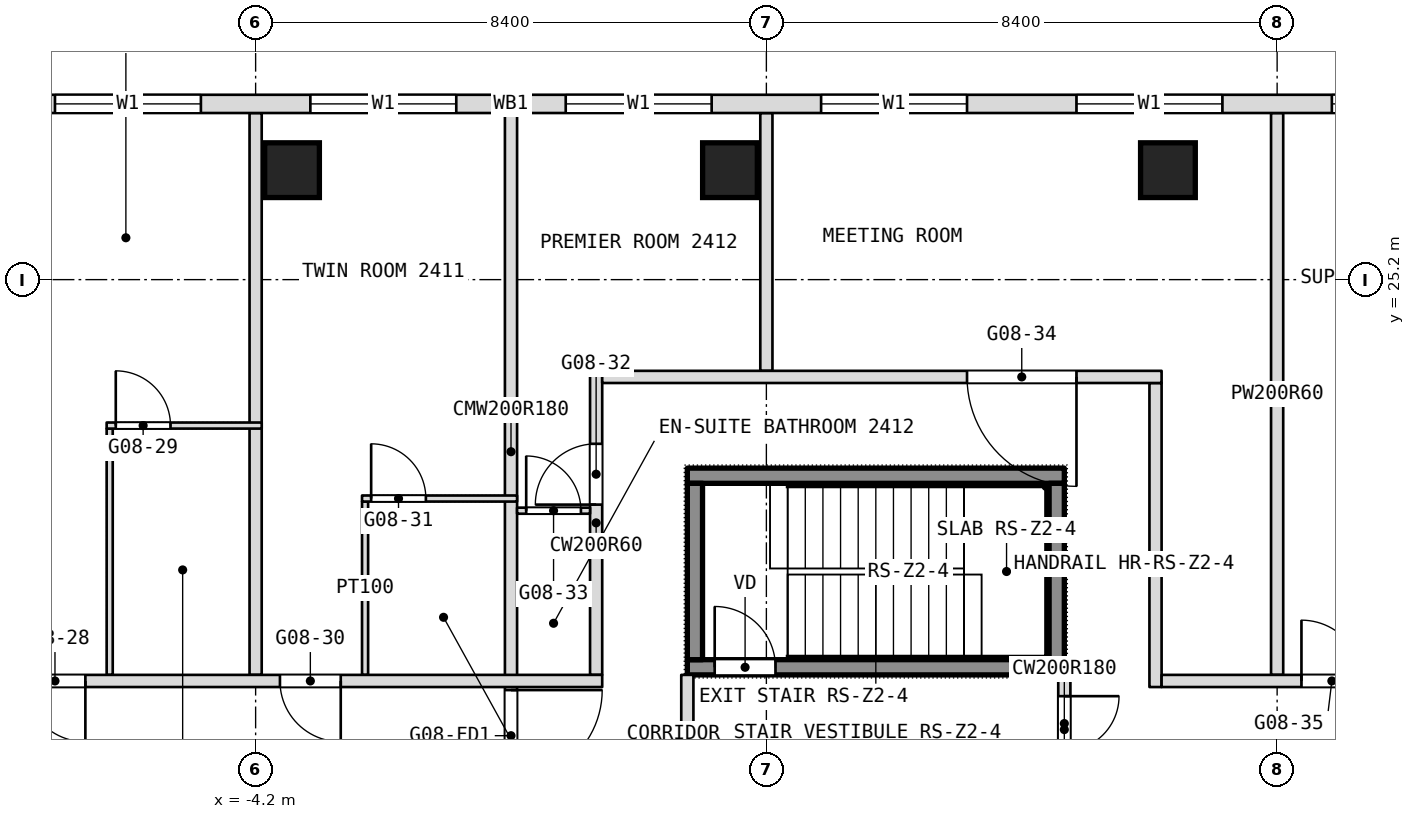
"""IFC4 building model, lengths in metres.
Left out: names, types, materials, properties, quantities, classifications, styles, units other than length and angle.
Written with IfcOpenShell. Run it as: python <this file> out.ifc"""

import sys

from ifc_helpers import new_model, si_unit, direction, frame, frame_2d, origin, origin_2d, place, context, subcontext, project, spatial, rectangle, extrude, element, fill, save


model = new_model("IFC4")
c1 = context("Model", 3, precision=1e-05, world=origin(), true_north=direction((0.0, 1.0)))
c2 = subcontext(c1, "Body", "Model", "MODEL_VIEW")
j1 = project(units=[si_unit("LENGTHUNIT", "METRE"), si_unit("PLANEANGLEUNIT", "RADIAN")], contexts=[c1])
p1 = place(None, origin())
s1 = spatial("IfcSite", under=j1, at=p1, CompositionType="ELEMENT")
p2 = place(p1, origin())
s2 = spatial("IfcBuilding", under=s1, at=p2, CompositionType="ELEMENT")
p3 = place(p2, frame((0.0, 0.0, 112.1)))
s3 = spatial("IfcBuildingStorey", under=s2, at=p3, CompositionType="ELEMENT", Elevation=112.1)
for number, where, z_axis, x_axis in (
    (1, (-3.601, 27.0, 0.0), (0.0, 0.0, 1.0), (1.0, 0.0, 0.0)),
    (2, (3.601, 27.0, 0.0), (0.0, 0.0, 1.0), (1.0, 0.0, 0.0)),
    (3, (10.804, 27.0, 0.0), (0.0, 0.0, 1.0), (1.0, 0.0, 0.0)),
):
    element("IfcColumn", number, at=place(p3, frame(where, z_axis=z_axis, x_axis=x_axis)), inside=s3, PredefinedType="COLUMN", context=c2, shape_type="SweptSolid", body=[
        extrude(rectangle(XDim=0.9, YDim=0.9, at=origin_2d()), origin(), (0.0, 0.0, 1.0), 3.6),
    ])
p4 = place(p3, frame((12.6, 18.7, 0.0), z_axis=(0.0, 0.0, 1.0), x_axis=(0.0, 1.0, 0.0)))
e4 = element("IfcWall", 4, at=p4, inside=s3, PredefinedType="PARTITIONING", context=c2, shape_type="SweptSolid", body=[
    extrude(rectangle(XDim=9.24, YDim=0.2, at=frame_2d((4.62, 0.0))), origin(), (0.0, 0.0, 1.0), 3.34),
])
p5 = place(p3, frame((10.6, 18.5, 0.0), z_axis=(0.0, 0.0, 1.0), x_axis=(0.0, 1.0, 0.0)))
e5 = element("IfcWall", 5, at=p5, inside=s3, PredefinedType="PARTITIONING", context=c2, shape_type="SweptSolid", body=[
    extrude(rectangle(XDim=5.0, YDim=0.2, at=frame_2d((2.5, 0.0))), origin(), (0.0, 0.0, 1.0), 3.34),
])
p6 = place(p3, frame((9.1, 16.9, 0.0), z_axis=(0.0, 0.0, 1.0), x_axis=(0.0, 1.0, 0.0)))
e6 = element("IfcWall", 6, at=p6, inside=s3, PredefinedType="PARTITIONING", context=c2, shape_type="SweptSolid", body=[
    extrude(rectangle(XDim=1.8, YDim=0.2, at=frame_2d((0.9, 0.0))), origin(), (0.0, 0.0, 1.0), 3.34),
])
p7 = place(p6, frame((0.55, 0.0, 0.0)))
e7 = element("IfcOpeningElement", 7, at=p7, cuts=e6, PredefinedType="OPENING", context=c2, shape_type="SweptSolid", body=[
    extrude(rectangle(XDim=0.9, YDim=2.1, at=frame_2d((0.45, 1.05))), frame((0.0, 0.1, 0.0), z_axis=(0.0, -1.0, 0.0), x_axis=(1.0, 0.0, 0.0)), (0.0, 0.0, 1.0), 0.2),
])
p8 = place(p3, frame((4.2, 23.7, 0.0), z_axis=(0.0, 0.0, 1.0), x_axis=(0.0, 1.0, 0.0)))
e8 = element("IfcWall", 8, at=p8, inside=s3, PredefinedType="PARTITIONING", context=c2, shape_type="SweptSolid", body=[
    extrude(rectangle(XDim=4.24, YDim=0.2, at=frame_2d((2.12, 0.0))), origin(), (0.0, 0.0, 1.0), 3.34),
])
p9 = place(p3, frame((2.9, 16.9, 0.0), z_axis=(0.0, 0.0, 1.0), x_axis=(0.0, 1.0, 0.0)))
e9 = element("IfcWall", 9, at=p9, inside=s3, PredefinedType="PARTITIONING", context=c2, shape_type="SweptSolid", body=[
    extrude(rectangle(XDim=1.8, YDim=0.2, at=frame_2d((0.9, 0.0))), origin(), (0.0, 0.0, 1.0), 3.34),
])
p10 = place(p3, frame((1.4, 18.7, 0.0), z_axis=(0.0, 0.0, 1.0), x_axis=(0.0, 1.0, 0.0)))
e10 = element("IfcWall", 10, at=p10, inside=s3, PredefinedType="PARTITIONING", context=c2, shape_type="SweptSolid", body=[
    extrude(rectangle(XDim=5.0, YDim=0.2, at=frame_2d((2.5, 0.0))), origin(), (0.0, 0.0, 1.0), 3.34),
])
p11 = place(p10, frame((2.8, 0.0, 0.0)))
e11 = element("IfcOpeningElement", 11, at=p11, cuts=e10, PredefinedType="OPENING", context=c2, shape_type="SweptSolid", body=[
    extrude(rectangle(XDim=1.0, YDim=2.1, at=frame_2d((0.5, 1.05))), frame((0.0, 0.1, 0.0), z_axis=(0.0, -1.0, 0.0), x_axis=(1.0, 0.0, 0.0)), (0.0, 0.0, 1.0), 0.2),
])
p12 = place(p3, frame((0.0, 16.8, 0.0), z_axis=(0.0, 0.0, 1.0), x_axis=(0.0, 1.0, 0.0)))
e12 = element("IfcWall", 12, at=p12, inside=s3, PredefinedType="PARTITIONING", context=c2, shape_type="SweptSolid", body=[
    extrude(rectangle(XDim=11.14, YDim=0.2, at=frame_2d((5.57, 0.0))), origin(), (0.0, 0.0, 1.0), 3.34),
])
p13 = place(p12, frame((0.15, 0.0, 0.0)))
e13 = element("IfcOpeningElement", 13, at=p13, cuts=e12, PredefinedType="OPENING", context=c2, shape_type="SweptSolid", body=[
    extrude(rectangle(XDim=1.5, YDim=2.1, at=frame_2d((0.75, 1.05))), frame((0.0, 0.1, 0.0), z_axis=(0.0, -1.0, 0.0), x_axis=(1.0, 0.0, 0.0)), (0.0, 0.0, 1.0), 0.2),
])
p14 = place(p3, frame((-2.4, 18.7, 0.0), z_axis=(0.0, 0.0, 1.0), x_axis=(0.0, 1.0, 0.0)))
e14 = element("IfcWall", 14, at=p14, inside=s3, PredefinedType="PARTITIONING", context=c2, shape_type="SweptSolid", body=[
    extrude(rectangle(XDim=2.85, YDim=0.1, at=frame_2d((1.425, 0.0))), origin(), (0.0, 0.0, 1.0), 3.34),
])
p15 = place(p3, frame((-4.2, 18.7, 0.0), z_axis=(0.0, 0.0, 1.0), x_axis=(0.0, 1.0, 0.0)))
e15 = element("IfcWall", 15, at=p15, inside=s3, PredefinedType="PARTITIONING", context=c2, shape_type="SweptSolid", body=[
    extrude(rectangle(XDim=9.24, YDim=0.2, at=frame_2d((4.62, 0.0))), origin(), (0.0, 0.0, 1.0), 3.34),
])
p16 = place(p3, frame((-6.6, 18.7, 0.0), z_axis=(0.0, 0.0, 1.0), x_axis=(0.0, 1.0, 0.0)))
e16 = element("IfcWall", 16, at=p16, inside=s3, PredefinedType="PARTITIONING", context=c2, shape_type="SweptSolid", body=[
    extrude(rectangle(XDim=4.05, YDim=0.1, at=frame_2d((2.025, 0.0))), origin(), (0.0, 0.0, 1.0), 3.34),
])
p17 = place(p3, frame((-16.9, 18.6, 0.0), z_axis=(0.0, 0.0, 1.0), x_axis=(1.0, 0.0, 0.0)))
e17 = element("IfcWall", 17, at=p17, inside=s3, PredefinedType="PARTITIONING", context=c2, shape_type="SweptSolid", body=[
    extrude(rectangle(XDim=18.4, YDim=0.2, at=frame_2d((9.2, 0.0))), origin(), (0.0, 0.0, 1.0), 3.34),
])
p18 = place(p17, frame((1.7, 0.0, 0.0)))
e18 = element("IfcOpeningElement", 18, at=p18, cuts=e17, PredefinedType="OPENING", context=c2, shape_type="SweptSolid", body=[
    extrude(rectangle(XDim=1.0, YDim=2.1, at=frame_2d((0.5, 1.05))), frame((0.0, 0.1, 0.0), z_axis=(0.0, -1.0, 0.0), x_axis=(1.0, 0.0, 0.0)), (0.0, 0.0, 1.0), 0.2),
])
p19 = place(p17, frame((7.1, 0.0, 0.0)))
e19 = element("IfcOpeningElement", 19, at=p19, cuts=e17, PredefinedType="OPENING", context=c2, shape_type="SweptSolid", body=[
    extrude(rectangle(XDim=1.0, YDim=2.1, at=frame_2d((0.5, 1.05))), frame((0.0, 0.1, 0.0), z_axis=(0.0, -1.0, 0.0), x_axis=(1.0, 0.0, 0.0)), (0.0, 0.0, 1.0), 0.2),
])
p20 = place(p17, frame((8.9, 0.0, 0.0)))
e20 = element("IfcOpeningElement", 20, at=p20, cuts=e17, PredefinedType="OPENING", context=c2, shape_type="SweptSolid", body=[
    extrude(rectangle(XDim=1.0, YDim=2.1, at=frame_2d((0.5, 1.05))), frame((0.0, 0.1, 0.0), z_axis=(0.0, -1.0, 0.0), x_axis=(1.0, 0.0, 0.0)), (0.0, 0.0, 1.0), 0.2),
])
p21 = place(p17, frame((13.1, 0.0, 0.0)))
e21 = element("IfcOpeningElement", 21, at=p21, cuts=e17, PredefinedType="OPENING", context=c2, shape_type="SweptSolid", body=[
    extrude(rectangle(XDim=1.0, YDim=2.1, at=frame_2d((0.5, 1.05))), frame((0.0, 0.1, 0.0), z_axis=(0.0, -1.0, 0.0), x_axis=(1.0, 0.0, 0.0)), (0.0, 0.0, 1.0), 0.2),
])
p22 = place(p3, frame((10.7, 18.6, 0.0), z_axis=(0.0, 0.0, 1.0), x_axis=(1.0, 0.0, 0.0)))
e22 = element("IfcWall", 22, at=p22, inside=s3, PredefinedType="PARTITIONING", context=c2, shape_type="SweptSolid", body=[
    extrude(rectangle(XDim=6.2, YDim=0.2, at=frame_2d((3.1, 0.0))), origin(), (0.0, 0.0, 1.0), 3.34),
])
p23 = place(p22, frame((2.3, 0.0, 0.0)))
e23 = element("IfcOpeningElement", 23, at=p23, cuts=e22, PredefinedType="OPENING", context=c2, shape_type="SweptSolid", body=[
    extrude(rectangle(XDim=1.0, YDim=2.1, at=frame_2d((0.5, 1.05))), frame((0.0, 0.1, 0.0), z_axis=(0.0, -1.0, 0.0), x_axis=(1.0, 0.0, 0.0)), (0.0, 0.0, 1.0), 0.2),
])
p24 = place(p3, frame((0.1, 21.4, 0.0), z_axis=(0.0, 0.0, 1.0), x_axis=(1.0, 0.0, 0.0)))
e24 = element("IfcWall", 24, at=p24, inside=s3, PredefinedType="PARTITIONING", context=c2, shape_type="SweptSolid", body=[
    extrude(rectangle(XDim=1.2, YDim=0.1, at=frame_2d((0.6, 0.0))), origin(), (0.0, 0.0, 1.0), 3.34),
])
p25 = place(p24, frame((0.15, 0.0, 0.0)))
e25 = element("IfcOpeningElement", 25, at=p25, cuts=e24, PredefinedType="OPENING", context=c2, shape_type="SweptSolid", body=[
    extrude(rectangle(XDim=0.9, YDim=2.1, at=frame_2d((0.45, 1.05))), frame((0.0, 0.05, 0.0), z_axis=(0.0, -1.0, 0.0), x_axis=(1.0, 0.0, 0.0)), (0.0, 0.0, 1.0), 0.1),
])
p26 = place(p3, frame((-2.45, 21.6, 0.0), z_axis=(0.0, 0.0, 1.0), x_axis=(1.0, 0.0, 0.0)))
e26 = element("IfcWall", 26, at=p26, inside=s3, PredefinedType="PARTITIONING", context=c2, shape_type="SweptSolid", body=[
    extrude(rectangle(XDim=2.55, YDim=0.1, at=frame_2d((1.275, 0.0))), origin(), (0.0, 0.0, 1.0), 3.34),
])
p27 = place(p26, frame((0.15, 0.0, 0.0)))
e27 = element("IfcOpeningElement", 27, at=p27, cuts=e26, PredefinedType="OPENING", context=c2, shape_type="SweptSolid", body=[
    extrude(rectangle(XDim=0.9, YDim=2.1, at=frame_2d((0.45, 1.05))), frame((0.0, 0.05, 0.0), z_axis=(0.0, -1.0, 0.0), x_axis=(1.0, 0.0, 0.0)), (0.0, 0.0, 1.0), 0.1),
])
p28 = place(p3, frame((-6.65, 22.8, 0.0), z_axis=(0.0, 0.0, 1.0), x_axis=(1.0, 0.0, 0.0)))
e28 = element("IfcWall", 28, at=p28, inside=s3, PredefinedType="PARTITIONING", context=c2, shape_type="SweptSolid", body=[
    extrude(rectangle(XDim=2.55, YDim=0.1, at=frame_2d((1.275, 0.0))), origin(), (0.0, 0.0, 1.0), 3.34),
])
p29 = place(p28, frame((0.15, 0.0, 0.0)))
e29 = element("IfcOpeningElement", 29, at=p29, cuts=e28, PredefinedType="OPENING", context=c2, shape_type="SweptSolid", body=[
    extrude(rectangle(XDim=0.9, YDim=2.1, at=frame_2d((0.45, 1.05))), frame((0.0, 0.05, 0.0), z_axis=(0.0, -1.0, 0.0), x_axis=(1.0, 0.0, 0.0)), (0.0, 0.0, 1.0), 0.1),
])
p30 = place(p3, frame((1.5, 23.6, 0.0), z_axis=(0.0, 0.0, 1.0), x_axis=(1.0, 0.0, 0.0)))
e30 = element("IfcWall", 30, at=p30, inside=s3, PredefinedType="PARTITIONING", context=c2, shape_type="SweptSolid", body=[
    extrude(rectangle(XDim=9.2, YDim=0.2, at=frame_2d((4.6, 0.0))), origin(), (0.0, 0.0, 1.0), 3.34),
])
p31 = place(p30, frame((6.0, 0.0, 0.0)))
e31 = element("IfcOpeningElement", 31, at=p31, cuts=e30, PredefinedType="OPENING", context=c2, shape_type="SweptSolid", body=[
    extrude(rectangle(XDim=1.8, YDim=2.1, at=frame_2d((0.9, 1.05))), frame((0.0, 0.1, 0.0), z_axis=(0.0, -1.0, 0.0), x_axis=(1.0, 0.0, 0.0)), (0.0, 0.0, 1.0), 0.2),
])
p32 = place(p3, frame((21.306, 28.09, 0.0), z_axis=(0.0, 0.0, 1.0), x_axis=(-1.0, 0.0, 0.0)))
e32 = element("IfcWall", 32, at=p32, inside=s3, PredefinedType="NOTDEFINED", context=c2, shape_type="SweptSolid", body=[
    extrude(rectangle(XDim=42.612, YDim=0.3, at=frame_2d((21.306, 0.0))), origin(), (0.0, 0.0, 1.0), 3.6),
])
p33 = place(p32, frame((5.406, 0.0, 0.9)))
e33 = element("IfcOpeningElement", 33, at=p33, cuts=e32, PredefinedType="OPENING", context=c2, shape_type="SweptSolid", body=[
    extrude(rectangle(XDim=2.4, YDim=2.1, at=frame_2d((1.2, 1.05))), frame((0.0, 0.15, 0.0), z_axis=(0.0, -1.0, 0.0), x_axis=(1.0, 0.0, 0.0)), (0.0, 0.0, 1.0), 0.3),
])
p34 = place(p32, frame((9.606, 0.0, 0.9)))
e34 = element("IfcOpeningElement", 34, at=p34, cuts=e32, PredefinedType="OPENING", context=c2, shape_type="SweptSolid", body=[
    extrude(rectangle(XDim=2.4, YDim=2.1, at=frame_2d((1.2, 1.05))), frame((0.0, 0.15, 0.0), z_axis=(0.0, -1.0, 0.0), x_axis=(1.0, 0.0, 0.0)), (0.0, 0.0, 1.0), 0.3),
])
p35 = place(p32, frame((13.806, 0.0, 0.9)))
e35 = element("IfcOpeningElement", 35, at=p35, cuts=e32, PredefinedType="OPENING", context=c2, shape_type="SweptSolid", body=[
    extrude(rectangle(XDim=2.4, YDim=2.1, at=frame_2d((1.2, 1.05))), frame((0.0, 0.15, 0.0), z_axis=(0.0, -1.0, 0.0), x_axis=(1.0, 0.0, 0.0)), (0.0, 0.0, 1.0), 0.3),
])
p36 = place(p32, frame((18.006, 0.0, 0.9)))
e36 = element("IfcOpeningElement", 36, at=p36, cuts=e32, PredefinedType="OPENING", context=c2, shape_type="SweptSolid", body=[
    extrude(rectangle(XDim=2.4, YDim=2.1, at=frame_2d((1.2, 1.05))), frame((0.0, 0.15, 0.0), z_axis=(0.0, -1.0, 0.0), x_axis=(1.0, 0.0, 0.0)), (0.0, 0.0, 1.0), 0.3),
])
p37 = place(p32, frame((22.206, 0.0, 0.9)))
e37 = element("IfcOpeningElement", 37, at=p37, cuts=e32, PredefinedType="OPENING", context=c2, shape_type="SweptSolid", body=[
    extrude(rectangle(XDim=2.4, YDim=2.1, at=frame_2d((1.2, 1.05))), frame((0.0, 0.15, 0.0), z_axis=(0.0, -1.0, 0.0), x_axis=(1.0, 0.0, 0.0)), (0.0, 0.0, 1.0), 0.3),
])
p38 = place(p32, frame((26.406, 0.0, 0.9)))
e38 = element("IfcOpeningElement", 38, at=p38, cuts=e32, PredefinedType="OPENING", context=c2, shape_type="SweptSolid", body=[
    extrude(rectangle(XDim=2.4, YDim=2.1, at=frame_2d((1.2, 1.05))), frame((0.0, 0.15, 0.0), z_axis=(0.0, -1.0, 0.0), x_axis=(1.0, 0.0, 0.0)), (0.0, 0.0, 1.0), 0.3),
])
p39 = place(p32, frame((30.606, 0.0, 0.9)))
e39 = element("IfcOpeningElement", 39, at=p39, cuts=e32, PredefinedType="OPENING", context=c2, shape_type="SweptSolid", body=[
    extrude(rectangle(XDim=2.4, YDim=2.1, at=frame_2d((1.2, 1.05))), frame((0.0, 0.15, 0.0), z_axis=(0.0, -1.0, 0.0), x_axis=(1.0, 0.0, 0.0)), (0.0, 0.0, 1.0), 0.3),
])
p40 = place(p32, frame((34.806, 0.0, 0.9)))
e40 = element("IfcOpeningElement", 40, at=p40, cuts=e32, PredefinedType="OPENING", context=c2, shape_type="SweptSolid", body=[
    extrude(rectangle(XDim=2.4, YDim=2.1, at=frame_2d((1.2, 1.05))), frame((0.0, 0.15, 0.0), z_axis=(0.0, -1.0, 0.0), x_axis=(1.0, 0.0, 0.0)), (0.0, 0.0, 1.0), 0.3),
])
p41 = place(p3, frame((2.9, 18.825, 0.1), z_axis=(0.0, 0.0, 1.0), x_axis=(1.0, 0.0, 0.0)))
e41 = element("IfcWall", 41, at=p41, inside=s3, PredefinedType="SHEAR", context=c2, shape_type="SweptSolid", body=[
    extrude(rectangle(XDim=6.2, YDim=0.25, at=frame_2d((3.1, 0.0))), origin(), (0.0, 0.0, 1.0), 3.6),
])
p42 = place(p41, frame((0.45, 0.0, 0.0)))
e42 = element("IfcOpeningElement", 42, at=p42, cuts=e41, PredefinedType="OPENING", context=c2, shape_type="SweptSolid", body=[
    extrude(rectangle(XDim=1.0, YDim=2.1, at=frame_2d((0.5, 1.05))), frame((0.0, 0.125, 0.0), z_axis=(0.0, -1.0, 0.0), x_axis=(1.0, 0.0, 0.0)), (0.0, 0.0, 1.0), 0.25),
])
p43 = place(p3, frame((2.9, 21.975, 0.1), z_axis=(0.0, 0.0, 1.0), x_axis=(1.0, 0.0, 0.0)))
e43 = element("IfcWall", 43, at=p43, inside=s3, PredefinedType="SHEAR", context=c2, shape_type="SweptSolid", body=[
    extrude(rectangle(XDim=6.2, YDim=0.25, at=frame_2d((3.1, 0.0))), origin(), (0.0, 0.0, 1.0), 3.6),
])
for number, where, z_axis, x_axis in (
    (44, (3.025, 18.95, 0.1), (0.0, 0.0, 1.0), (0.0, 1.0, 0.0)),
    (45, (8.975, 18.95, 0.1), (0.0, 0.0, 1.0), (0.0, 1.0, 0.0)),
):
    element("IfcWall", number, at=place(p3, frame(where, z_axis=z_axis, x_axis=x_axis)), inside=s3, PredefinedType="SHEAR", context=c2, shape_type="SweptSolid", body=[
        extrude(rectangle(XDim=2.9, YDim=0.25, at=frame_2d((1.45, 0.0))), origin(), (0.0, 0.0, 1.0), 3.6),
    ])
p44 = place(p7, origin())
e46 = element("IfcDoor", 46, at=p44, inside=s3, OperationType="SINGLE_SWING_RIGHT", PredefinedType="DOOR", context=c2, shape_type="SweptSolid", body=[
    extrude(rectangle(XDim=0.9, YDim=2.1, at=frame_2d((0.45, 1.05))), frame((0.0, 0.025, 0.0), z_axis=(0.0, -1.0, 0.0), x_axis=(1.0, 0.0, 0.0)), (0.0, 0.0, 1.0), 0.05),
])
fill(e7, e46)
p45 = place(p11, origin())
e47 = element("IfcDoor", 47, at=p45, inside=s3, OperationType="SINGLE_SWING_RIGHT", PredefinedType="DOOR", context=c2, shape_type="SweptSolid", body=[
    extrude(rectangle(XDim=1.0, YDim=2.1, at=frame_2d((0.5, 1.05))), frame((0.0, 0.025, 0.0), z_axis=(0.0, -1.0, 0.0), x_axis=(1.0, 0.0, 0.0)), (0.0, 0.0, 1.0), 0.05),
])
fill(e11, e47)
p46 = place(p20, origin())
e48 = element("IfcDoor", 48, at=p46, inside=s3, OperationType="SINGLE_SWING_LEFT", PredefinedType="DOOR", context=c2, shape_type="SweptSolid", body=[
    extrude(rectangle(XDim=1.0, YDim=2.1, at=frame_2d((0.5, 1.05))), frame((0.0, 0.025, 0.0), z_axis=(0.0, -1.0, 0.0), x_axis=(1.0, 0.0, 0.0)), (0.0, 0.0, 1.0), 0.05),
])
fill(e20, e48)
p47 = place(p21, origin())
e49 = element("IfcDoor", 49, at=p47, inside=s3, OperationType="SINGLE_SWING_LEFT", PredefinedType="DOOR", context=c2, shape_type="SweptSolid", body=[
    extrude(rectangle(XDim=1.0, YDim=2.1, at=frame_2d((0.5, 1.05))), frame((0.0, 0.025, 0.0), z_axis=(0.0, -1.0, 0.0), x_axis=(1.0, 0.0, 0.0)), (0.0, 0.0, 1.0), 0.05),
])
fill(e21, e49)
p48 = place(p23, origin())
e50 = element("IfcDoor", 50, at=p48, inside=s3, OperationType="SINGLE_SWING_RIGHT", PredefinedType="DOOR", context=c2, shape_type="SweptSolid", body=[
    extrude(rectangle(XDim=1.0, YDim=2.1, at=frame_2d((0.5, 1.05))), frame((0.0, 0.025, 0.0), z_axis=(0.0, -1.0, 0.0), x_axis=(1.0, 0.0, 0.0)), (0.0, 0.0, 1.0), 0.05),
])
fill(e23, e50)
p49 = place(p25, origin())
e51 = element("IfcDoor", 51, at=p49, inside=s3, OperationType="SINGLE_SWING_LEFT", PredefinedType="DOOR", context=c2, shape_type="SweptSolid", body=[
    extrude(rectangle(XDim=0.9, YDim=2.1, at=frame_2d((0.45, 1.05))), frame((0.0, 0.025, 0.0), z_axis=(0.0, -1.0, 0.0), x_axis=(1.0, 0.0, 0.0)), (0.0, 0.0, 1.0), 0.05),
])
fill(e25, e51)
p50 = place(p27, origin())
e52 = element("IfcDoor", 52, at=p50, inside=s3, OperationType="SINGLE_SWING_RIGHT", PredefinedType="DOOR", context=c2, shape_type="SweptSolid", body=[
    extrude(rectangle(XDim=0.9, YDim=2.1, at=frame_2d((0.45, 1.05))), frame((0.0, 0.025, 0.0), z_axis=(0.0, -1.0, 0.0), x_axis=(1.0, 0.0, 0.0)), (0.0, 0.0, 1.0), 0.05),
])
fill(e27, e52)
p51 = place(p29, origin())
e53 = element("IfcDoor", 53, at=p51, inside=s3, OperationType="SINGLE_SWING_RIGHT", PredefinedType="DOOR", context=c2, shape_type="SweptSolid", body=[
    extrude(rectangle(XDim=0.9, YDim=2.1, at=frame_2d((0.45, 1.05))), frame((0.0, 0.025, 0.0), z_axis=(0.0, -1.0, 0.0), x_axis=(1.0, 0.0, 0.0)), (0.0, 0.0, 1.0), 0.05),
])
fill(e29, e53)
p52 = place(p31, origin())
e54 = element("IfcDoor", 54, at=p52, inside=s3, OperationType="DOUBLE_DOOR_SINGLE_SWING", PredefinedType="DOOR", context=c2, shape_type="SweptSolid", body=[
    extrude(rectangle(XDim=1.8, YDim=2.1, at=frame_2d((0.9, 1.05))), frame((0.0, 0.025, 0.0), z_axis=(0.0, -1.0, 0.0), x_axis=(1.0, 0.0, 0.0)), (0.0, 0.0, 1.0), 0.05),
])
fill(e31, e54)
p53 = place(p33, origin())
e55 = element("IfcWindow", 55, at=p53, inside=s3, PartitioningType="SINGLE_PANEL", PredefinedType="WINDOW", context=c2, shape_type="SweptSolid", body=[
    extrude(rectangle(XDim=2.4, YDim=2.1, at=frame_2d((1.2, 1.05))), frame((0.0, 0.03, 0.0), z_axis=(0.0, -1.0, 0.0), x_axis=(1.0, 0.0, 0.0)), (0.0, 0.0, 1.0), 0.06),
])
fill(e33, e55)
p54 = place(p34, origin())
e56 = element("IfcWindow", 56, at=p54, inside=s3, PartitioningType="SINGLE_PANEL", PredefinedType="WINDOW", context=c2, shape_type="SweptSolid", body=[
    extrude(rectangle(XDim=2.4, YDim=2.1, at=frame_2d((1.2, 1.05))), frame((0.0, 0.03, 0.0), z_axis=(0.0, -1.0, 0.0), x_axis=(1.0, 0.0, 0.0)), (0.0, 0.0, 1.0), 0.06),
])
fill(e34, e56)
p55 = place(p35, origin())
e57 = element("IfcWindow", 57, at=p55, inside=s3, PartitioningType="SINGLE_PANEL", PredefinedType="WINDOW", context=c2, shape_type="SweptSolid", body=[
    extrude(rectangle(XDim=2.4, YDim=2.1, at=frame_2d((1.2, 1.05))), frame((0.0, 0.03, 0.0), z_axis=(0.0, -1.0, 0.0), x_axis=(1.0, 0.0, 0.0)), (0.0, 0.0, 1.0), 0.06),
])
fill(e35, e57)
p56 = place(p36, origin())
e58 = element("IfcWindow", 58, at=p56, inside=s3, PartitioningType="SINGLE_PANEL", PredefinedType="WINDOW", context=c2, shape_type="SweptSolid", body=[
    extrude(rectangle(XDim=2.4, YDim=2.1, at=frame_2d((1.2, 1.05))), frame((0.0, 0.03, 0.0), z_axis=(0.0, -1.0, 0.0), x_axis=(1.0, 0.0, 0.0)), (0.0, 0.0, 1.0), 0.06),
])
fill(e36, e58)
p57 = place(p37, origin())
e59 = element("IfcWindow", 59, at=p57, inside=s3, PartitioningType="SINGLE_PANEL", PredefinedType="WINDOW", context=c2, shape_type="SweptSolid", body=[
    extrude(rectangle(XDim=2.4, YDim=2.1, at=frame_2d((1.2, 1.05))), frame((0.0, 0.03, 0.0), z_axis=(0.0, -1.0, 0.0), x_axis=(1.0, 0.0, 0.0)), (0.0, 0.0, 1.0), 0.06),
])
fill(e37, e59)
p58 = place(p38, origin())
e60 = element("IfcWindow", 60, at=p58, inside=s3, PartitioningType="SINGLE_PANEL", PredefinedType="WINDOW", context=c2, shape_type="SweptSolid", body=[
    extrude(rectangle(XDim=2.4, YDim=2.1, at=frame_2d((1.2, 1.05))), frame((0.0, 0.03, 0.0), z_axis=(0.0, -1.0, 0.0), x_axis=(1.0, 0.0, 0.0)), (0.0, 0.0, 1.0), 0.06),
])
fill(e38, e60)
p59 = place(p42, origin())
e61 = element("IfcDoor", 61, at=p59, inside=s3, OperationType="SINGLE_SWING_LEFT", PredefinedType="DOOR", context=c2, shape_type="SweptSolid", body=[
    extrude(rectangle(XDim=1.0, YDim=2.1, at=frame_2d((0.5, 1.05))), frame((0.0, 0.025, 0.0), z_axis=(0.0, -1.0, 0.0), x_axis=(1.0, 0.0, 0.0)), (0.0, 0.0, 1.0), 0.05),
])
fill(e42, e61)
p60 = place(p13, origin())
e62 = element("IfcDoor", 62, at=p60, inside=s3, OperationType="DOUBLE_DOOR_DOUBLE_SWING", PredefinedType="DOOR", context=c2, shape_type="SweptSolid", body=[
    extrude(rectangle(XDim=1.5, YDim=2.1, at=frame_2d((0.75, 1.05))), frame((0.0, 0.025, 0.0), z_axis=(0.0, -1.0, 0.0), x_axis=(1.0, 0.0, 0.0)), (0.0, 0.0, 1.0), 0.05),
])
fill(e13, e62)
save(model, sys.argv[1])
